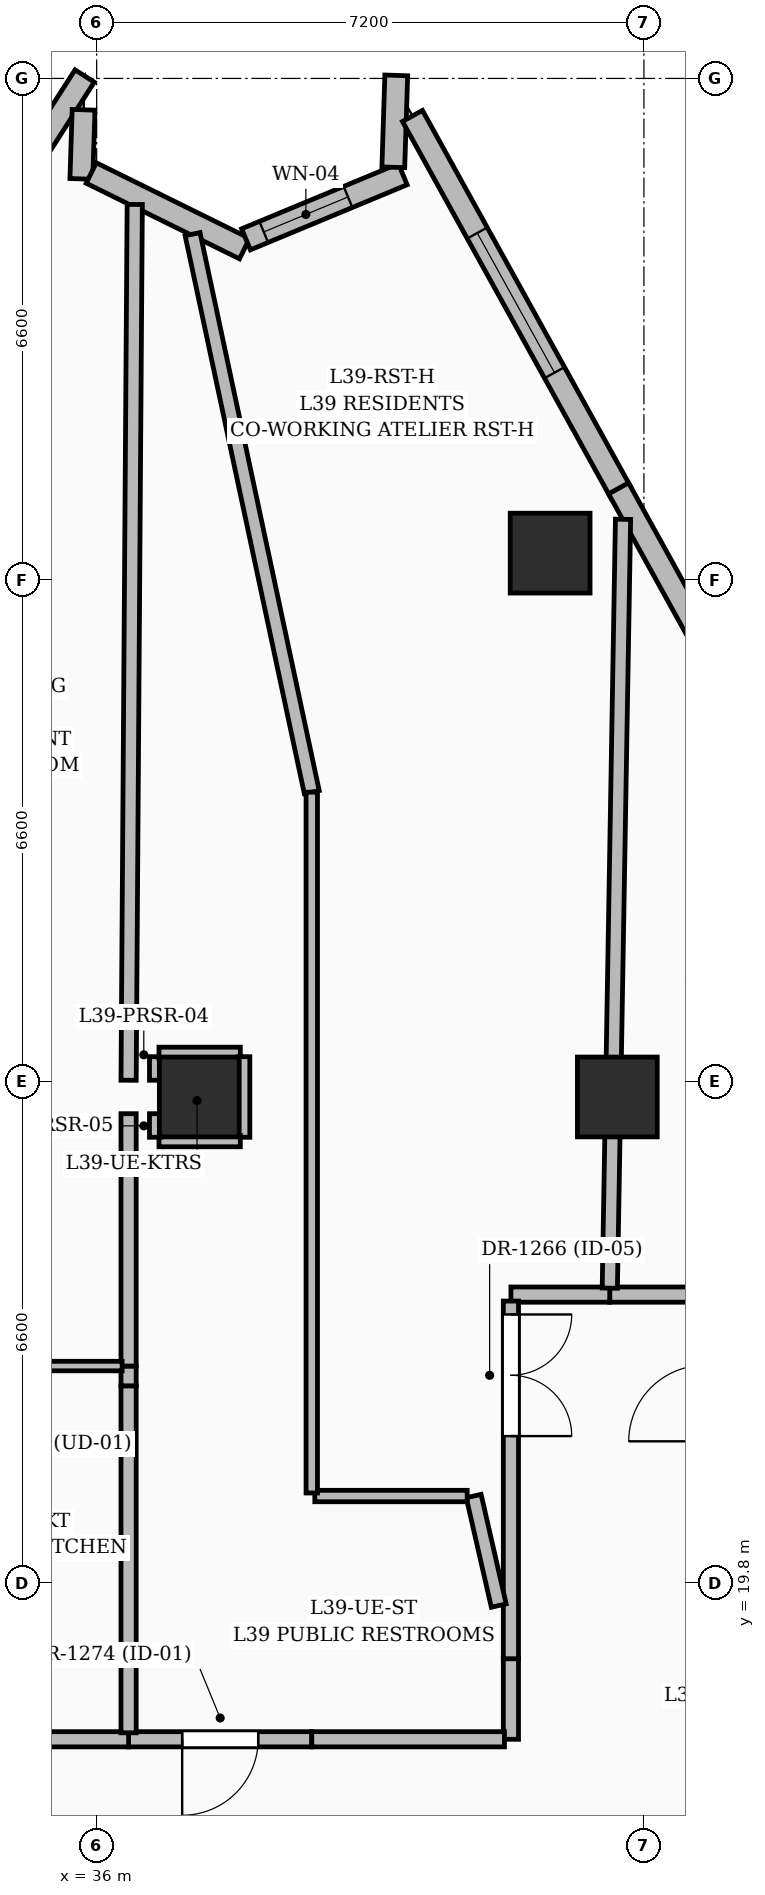
"""IFC4 building model, lengths in metres.
Left out: names, types, materials, properties, quantities, classifications, styles, units other than length and angle.
Written with IfcOpenShell. Run it as: python <this file> out.ifc"""

import sys

from ifc_helpers import new_model, si_unit, direction, frame, frame_2d, origin, origin_2d, place, context, subcontext, project, spatial, rectangle, extrude, element, fill, save


model = new_model("IFC4")
c1 = context("Model", 3, precision=1e-05, world=origin(), true_north=direction((0.0, 1.0)))
c2 = subcontext(c1, "Body", "Model", "MODEL_VIEW")
j1 = project(units=[si_unit("LENGTHUNIT", "METRE"), si_unit("PLANEANGLEUNIT", "RADIAN")], contexts=[c1])
p1 = place(None, origin())
s1 = spatial("IfcSite", under=j1, at=p1, CompositionType="ELEMENT")
p2 = place(p1, origin())
s2 = spatial("IfcBuilding", under=s1, at=p2, CompositionType="ELEMENT")
p3 = place(p2, frame((0.0, 0.0, 153.6)))
s3 = spatial("IfcBuildingStorey", under=s2, at=p3, CompositionType="ELEMENT", Elevation=153.6)
for number, where, z_axis, x_axis in (
    (1, (42.85, 26.2, 0.0), (0.0, 0.0, 1.0), (1.0, 0.0, 0.0)),
    (2, (37.35, 26.2, 0.0), (0.0, 0.0, 1.0), (1.0, 0.0, 0.0)),
    (3, (41.966, 33.355, 0.0), (0.0, 0.0, 1.0), (1.0, 0.0, 0.0)),
):
    element("IfcColumn", number, at=place(p3, frame(where, z_axis=z_axis, x_axis=x_axis)), inside=s3, PredefinedType="COLUMN", context=c2, shape_type="SweptSolid", body=[
        extrude(rectangle(XDim=1.05, YDim=1.05, at=origin_2d()), origin(), (0.0, 0.0, 1.0), 3.6),
    ])
p4 = place(p3, frame((32.455, 34.345, 0.0), z_axis=(0.0, 0.0, 1.0), x_axis=(0.539489448276, 0.841992360535, 0.0)))
e4 = element("IfcWall", 4, at=p4, inside=s3, PredefinedType="SOLIDWALL", context=c2, shape_type="SweptSolid", body=[
    extrude(rectangle(XDim=6.279, YDim=0.3, at=frame_2d((3.14, 0.0))), origin(), (0.0, 0.0, 1.0), 3.35),
])
p5 = place(p4, frame((1.75, 0.0, 0.6)))
e5 = element("IfcOpeningElement", 5, at=p5, cuts=e4, PredefinedType="OPENING", context=c2, shape_type="SweptSolid", body=[
    extrude(rectangle(XDim=1.8, YDim=2.1, at=frame_2d((0.9, 1.05))), frame((0.0, 0.16, 0.0), z_axis=(0.0, -1.0, 0.0), x_axis=(1.0, 0.0, 0.0)), (0.0, 0.0, 1.0), 0.32),
])
p6 = place(p3, frame((35.828, 39.187, 0.0), z_axis=(0.0, 0.0, 1.0), x_axis=(-0.031938584897, -0.999489833262, 0.0)))
e6 = element("IfcWall", 6, at=p6, inside=s3, PredefinedType="SOLIDWALL", context=c2, shape_type="SweptSolid", body=[
    extrude(rectangle(XDim=0.91, YDim=0.3, at=frame_2d((0.455, 0.0))), origin(), (0.0, 0.0, 1.0), 3.35),
])
p7 = place(p3, frame((35.928, 38.356, 0.0), z_axis=(0.0, 0.0, 1.0), x_axis=(0.896845505116, -0.442343915922, 0.0)))
e7 = element("IfcWall", 7, at=p7, inside=s3, PredefinedType="SOLIDWALL", context=c2, shape_type="SweptSolid", body=[
    extrude(rectangle(XDim=2.249, YDim=0.3, at=frame_2d((1.125, 0.0))), origin(), (0.0, 0.0, 1.0), 3.35),
])
p8 = place(p3, frame((37.965, 37.483, 0.0), z_axis=(0.0, 0.0, 1.0), x_axis=(0.923541991646, 0.383497313766, 0.0)))
e8 = element("IfcWall", 8, at=p8, inside=s3, PredefinedType="SOLIDWALL", context=c2, shape_type="SweptSolid", body=[
    extrude(rectangle(XDim=2.233, YDim=0.3, at=frame_2d((1.117, 0.0))), origin(), (0.0, 0.0, 1.0), 3.35),
])
p9 = place(p8, frame((0.253, 0.0, 0.8)))
e9 = element("IfcOpeningElement", 9, at=p9, cuts=e8, PredefinedType="OPENING", context=c2, shape_type="SweptSolid", body=[
    extrude(rectangle(XDim=1.2, YDim=1.8, at=frame_2d((0.6, 0.9))), frame((0.0, 0.16, 0.0), z_axis=(0.0, -1.0, 0.0), x_axis=(1.0, 0.0, 0.0)), (0.0, 0.0, 1.0), 0.32),
])
p10 = place(p3, frame((39.903, 38.431, 0.0), z_axis=(0.0, 0.0, 1.0), x_axis=(0.032091701063, 0.999484928712, 0.0)))
e10 = element("IfcWall", 10, at=p10, inside=s3, PredefinedType="SOLIDWALL", context=c2, shape_type="SweptSolid", body=[
    extrude(rectangle(XDim=1.21, YDim=0.3, at=frame_2d((0.605, 0.0))), origin(), (0.0, 0.0, 1.0), 3.35),
])
p11 = place(p3, frame((40.155, 39.106, 0.0), z_axis=(0.0, 0.0, 1.0), x_axis=(0.484204903903, -0.874954633702, 0.0)))
e11 = element("IfcWall", 11, at=p11, inside=s3, PredefinedType="SOLIDWALL", context=c2, shape_type="SweptSolid", body=[
    extrude(rectangle(XDim=5.653, YDim=0.3, at=frame_2d((2.827, 0.0))), origin(), (0.0, 0.0, 1.0), 3.35),
])
p12 = place(p11, frame((1.76, 0.0, 0.55)))
e12 = element("IfcOpeningElement", 12, at=p12, cuts=e11, PredefinedType="OPENING", context=c2, shape_type="SweptSolid", body=[
    extrude(rectangle(XDim=2.1, YDim=2.4, at=frame_2d((1.05, 1.2))), frame((0.0, 0.16, 0.0), z_axis=(0.0, -1.0, 0.0), x_axis=(1.0, 0.0, 0.0)), (0.0, 0.0, 1.0), 0.32),
])
p13 = place(p3, frame((42.866, 34.206, 0.0), z_axis=(0.0, 0.0, 1.0), x_axis=(0.484193476584, -0.874960957548, 0.0)))
e13 = element("IfcWall", 13, at=p13, inside=s3, PredefinedType="SOLIDWALL", context=c2, shape_type="SweptSolid", body=[
    extrude(rectangle(XDim=5.48, YDim=0.3, at=frame_2d((2.74, 0.0))), origin(), (0.0, 0.0, 1.0), 3.35),
])
p14 = place(p13, frame((2.145, 0.0, 0.6)))
e14 = element("IfcOpeningElement", 14, at=p14, cuts=e13, PredefinedType="OPENING", context=c2, shape_type="SweptSolid", body=[
    extrude(rectangle(XDim=1.8, YDim=2.1, at=frame_2d((0.9, 1.05))), frame((0.0, 0.16, 0.0), z_axis=(0.0, -1.0, 0.0), x_axis=(1.0, 0.0, 0.0)), (0.0, 0.0, 1.0), 0.32),
])
p15 = place(p3, frame((38.83, 17.75, 0.0), z_axis=(0.0, 0.0, 1.0), x_axis=(-1.0, 0.0, 0.0)))
e15 = element("IfcWall", 15, at=p15, inside=s3, PredefinedType="PARTITIONING", context=c2, shape_type="SweptSolid", body=[
    extrude(rectangle(XDim=2.41, YDim=0.2, at=frame_2d((1.205, 0.0))), origin(), (0.0, 0.0, 1.0), 3.35),
])
p16 = place(p15, frame((0.705, 0.0, 0.0)))
e16 = element("IfcOpeningElement", 16, at=p16, cuts=e15, PredefinedType="OPENING", context=c2, shape_type="SweptSolid", body=[
    extrude(rectangle(XDim=1.0, YDim=2.2, at=frame_2d((0.5, 1.1))), frame((0.0, 0.11, 0.0), z_axis=(0.0, -1.0, 0.0), x_axis=(1.0, 0.0, 0.0)), (0.0, 0.0, 1.0), 0.22),
])
p17 = place(p3, frame((41.45, 18.81, 0.0), z_axis=(0.0, 0.0, 1.0), x_axis=(0.0, -1.0, 0.0)))
e17 = element("IfcWall", 17, at=p17, inside=s3, PredefinedType="PARTITIONING", context=c2, shape_type="SweptSolid", body=[
    extrude(rectangle(XDim=1.06, YDim=0.2, at=frame_2d((0.53, 0.0))), origin(), (0.0, 0.0, 1.0), 3.35),
])
p18 = place(p3, frame((41.365, 17.75, 0.0), z_axis=(0.0, 0.0, 1.0), x_axis=(-1.0, 0.0, 0.0)))
e18 = element("IfcWall", 18, at=p18, inside=s3, PredefinedType="PARTITIONING", context=c2, shape_type="SweptSolid", body=[
    extrude(rectangle(XDim=2.535, YDim=0.2, at=frame_2d((1.268, 0.0))), origin(), (0.0, 0.0, 1.0), 3.35),
])
p19 = place(p3, frame((43.915, 23.6, 0.0), z_axis=(0.0, 0.0, 1.0), x_axis=(-1.0, 0.0, 0.0)))
e19 = element("IfcWall", 19, at=p19, inside=s3, PredefinedType="PARTITIONING", context=c2, shape_type="SweptSolid", body=[
    extrude(rectangle(XDim=1.165, YDim=0.2, at=frame_2d((0.583, 0.0))), origin(), (0.0, 0.0, 1.0), 2.436),
])
p20 = place(p3, frame((36.42, 17.75, 0.0), z_axis=(0.0, 0.0, 1.0), x_axis=(-1.0, 0.0, 0.0)))
e20 = element("IfcWall", 20, at=p20, inside=s3, PredefinedType="PARTITIONING", context=c2, shape_type="SweptSolid", body=[
    extrude(rectangle(XDim=2.8, YDim=0.2, at=frame_2d((1.4, 0.0))), origin(), (0.0, 0.0, 1.0), 2.436),
])
p21 = place(p3, frame((42.75, 23.6, 0.0), z_axis=(0.0, 0.0, 1.0), x_axis=(-1.0, 0.0, 0.0)))
e21 = element("IfcWall", 21, at=p21, inside=s3, PredefinedType="PARTITIONING", context=c2, shape_type="SweptSolid", body=[
    extrude(rectangle(XDim=1.3, YDim=0.2, at=frame_2d((0.65, 0.0))), origin(), (0.0, 0.0, 1.0), 3.35),
])
p22 = place(p3, frame((41.45, 23.515, 0.0), z_axis=(0.0, 0.0, 1.0), x_axis=(0.0, -1.0, 0.0)))
e22 = element("IfcWall", 22, at=p22, inside=s3, PredefinedType="PARTITIONING", context=c2, shape_type="SweptSolid", body=[
    extrude(rectangle(XDim=4.705, YDim=0.2, at=frame_2d((2.353, 0.0))), origin(), (0.0, 0.0, 1.0), 3.35),
])
p23 = place(p22, frame((0.176, 0.0, 0.0)))
e23 = element("IfcOpeningElement", 23, at=p23, cuts=e22, PredefinedType="OPENING", context=c2, shape_type="SweptSolid", body=[
    extrude(rectangle(XDim=1.6, YDim=2.3, at=frame_2d((0.8, 1.15))), frame((0.0, 0.11, 0.0), z_axis=(0.0, -1.0, 0.0), x_axis=(1.0, 0.0, 0.0)), (0.0, 0.0, 1.0), 0.22),
])
p24 = place(p3, frame((36.42, 22.4, 0.0), z_axis=(0.0, 0.0, 1.0), x_axis=(0.0, -1.0, 0.0)))
e24 = element("IfcWall", 24, at=p24, inside=s3, PredefinedType="PARTITIONING", context=c2, shape_type="SweptSolid", body=[
    extrude(rectangle(XDim=4.565, YDim=0.2, at=frame_2d((2.282, 0.0))), origin(), (0.0, 0.0, 1.0), 3.35),
])
p25 = place(p3, frame((36.42, 22.66, 0.0), z_axis=(0.0, 0.0, 1.0), x_axis=(0.0, -1.0, 0.0)))
e25 = element("IfcWall", 25, at=p25, inside=s3, PredefinedType="PARTITIONING", context=c2, shape_type="SweptSolid", body=[
    extrude(rectangle(XDim=0.26, YDim=0.2, at=frame_2d((0.13, 0.0))), origin(), (0.0, 0.0, 1.0), 3.35),
])
p26 = place(p3, frame((36.42, 25.98, 0.0), z_axis=(0.0, 0.0, 1.0), x_axis=(0.0, -1.0, 0.0)))
e26 = element("IfcWall", 26, at=p26, inside=s3, PredefinedType="PARTITIONING", context=c2, shape_type="SweptSolid", body=[
    extrude(rectangle(XDim=3.32, YDim=0.2, at=frame_2d((1.66, 0.0))), origin(), (0.0, 0.0, 1.0), 2.436),
])
p27 = place(p3, frame((36.501, 37.942, 0.0), z_axis=(0.0, 0.0, 1.0), x_axis=(-0.007034618495, -0.999975256765, 0.0)))
e27 = element("IfcWall", 27, at=p27, inside=s3, PredefinedType="PARTITIONING", context=c2, shape_type="SweptSolid", body=[
    extrude(rectangle(XDim=11.522, YDim=0.2, at=frame_2d((5.761, 0.0))), origin(), (0.0, 0.0, 1.0), 2.393),
])
p28 = place(p3, frame((38.83, 30.21, 0.0), z_axis=(0.0, 0.0, 1.0), x_axis=(-0.208896033751, 0.977937854407, 0.0)))
e28 = element("IfcWall", 28, at=p28, inside=s3, PredefinedType="PARTITIONING", context=c2, shape_type="SweptSolid", body=[
    extrude(rectangle(XDim=7.507, YDim=0.2, at=frame_2d((3.753, 0.0))), origin(), (0.0, 0.0, 1.0), 2.57),
])
p29 = place(p3, frame((41.29, 19.509, 0.0), z_axis=(0.0, 0.0, 1.0), x_axis=(-0.223291159638, 0.974751793036, 0.0)))
e29 = element("IfcWall", 29, at=p29, inside=s3, PredefinedType="PARTITIONING", context=c2, shape_type="SweptSolid", body=[
    extrude(rectangle(XDim=1.478, YDim=0.2, at=frame_2d((0.739, 0.0))), origin(), (0.0, 0.0, 1.0), 3.35),
])
p30 = place(p3, frame((42.925, 33.8, 0.0), z_axis=(0.0, 0.0, 1.0), x_axis=(-0.017206788201, -0.999851952261, 0.0)))
e30 = element("IfcWall", 30, at=p30, inside=s3, PredefinedType="PARTITIONING", context=c2, shape_type="SweptSolid", body=[
    extrude(rectangle(XDim=10.116, YDim=0.2, at=frame_2d((5.058, 0.0))), origin(), (0.0, 0.0, 1.0), 2.393),
])
p31 = place(p3, frame((36.335, 22.66, 0.0), z_axis=(0.0, 0.0, 1.0), x_axis=(-1.0, 0.0, 0.0)))
e31 = element("IfcWall", 31, at=p31, inside=s3, PredefinedType="PARTITIONING", context=c2, shape_type="SweptSolid", body=[
    extrude(rectangle(XDim=3.087, YDim=0.125, at=frame_2d((1.544, 0.0))), origin(), (0.0, 0.0, 1.0), 2.436),
])
p32 = place(p31, frame((0.991, 0.0, 0.0)))
e32 = element("IfcOpeningElement", 32, at=p32, cuts=e31, PredefinedType="OPENING", context=c2, shape_type="SweptSolid", body=[
    extrude(rectangle(XDim=0.95, YDim=2.2, at=frame_2d((0.475, 1.1))), frame((0.0, 0.072, 0.0), z_axis=(0.0, -1.0, 0.0), x_axis=(1.0, 0.0, 0.0)), (0.0, 0.0, 1.0), 0.145),
])
p33 = place(p3, frame((36.77, 26.42, 0.0), z_axis=(0.0, 0.0, 1.0), x_axis=(0.0, 1.0, 0.0)))
e33 = element("IfcWall", 33, at=p33, inside=s3, PredefinedType="PARTITIONING", context=c2, shape_type="SweptSolid", body=[
    extrude(rectangle(XDim=0.31, YDim=0.15, at=frame_2d((0.155, 0.0))), origin(), (0.0, 0.0, 1.0), 2.393),
])
p34 = place(p3, frame((36.82, 26.78, 0.0), z_axis=(0.0, 0.0, 1.0), x_axis=(1.0, 0.0, 0.0)))
e34 = element("IfcWall", 34, at=p34, inside=s3, PredefinedType="PARTITIONING", context=c2, shape_type="SweptSolid", body=[
    extrude(rectangle(XDim=1.07, YDim=0.15, at=frame_2d((0.535, 0.0))), origin(), (0.0, 0.0, 1.0), 2.393),
])
p35 = place(p3, frame((37.94, 26.73, 0.0), z_axis=(0.0, 0.0, 1.0), x_axis=(0.0, -1.0, 0.0)))
e35 = element("IfcWall", 35, at=p35, inside=s3, PredefinedType="PARTITIONING", context=c2, shape_type="SweptSolid", body=[
    extrude(rectangle(XDim=1.06, YDim=0.15, at=frame_2d((0.53, 0.0))), origin(), (0.0, 0.0, 1.0), 2.436),
])
p36 = place(p3, frame((37.89, 25.62, 0.0), z_axis=(0.0, 0.0, 1.0), x_axis=(-1.0, 0.0, 0.0)))
e36 = element("IfcWall", 36, at=p36, inside=s3, PredefinedType="PARTITIONING", context=c2, shape_type="SweptSolid", body=[
    extrude(rectangle(XDim=1.07, YDim=0.15, at=frame_2d((0.535, 0.0))), origin(), (0.0, 0.0, 1.0), 2.436),
])
p37 = place(p3, frame((36.77, 25.67, 0.0), z_axis=(0.0, 0.0, 1.0), x_axis=(0.0, 1.0, 0.0)))
e37 = element("IfcWall", 37, at=p37, inside=s3, PredefinedType="PARTITIONING", context=c2, shape_type="SweptSolid", body=[
    extrude(rectangle(XDim=0.31, YDim=0.15, at=frame_2d((0.155, 0.0))), origin(), (0.0, 0.0, 1.0), 3.35),
])
p38 = place(p3, frame((40.875, 20.95, 0.0), z_axis=(0.0, 0.0, 1.0), x_axis=(-1.0, 0.0, 0.0)))
e38 = element("IfcWall", 38, at=p38, inside=s3, PredefinedType="PARTITIONING", context=c2, shape_type="SweptSolid", body=[
    extrude(rectangle(XDim=2.005, YDim=0.15, at=frame_2d((1.002, 0.0))), origin(), (0.0, 0.0, 1.0), 3.35),
])
p39 = place(p3, frame((38.83, 20.99, 0.0), z_axis=(0.0, 0.0, 1.0), x_axis=(0.0, 1.0, 0.0)))
e39 = element("IfcWall", 39, at=p39, inside=s3, PredefinedType="PARTITIONING", context=c2, shape_type="SweptSolid", body=[
    extrude(rectangle(XDim=9.22, YDim=0.15, at=frame_2d((4.61, 0.0))), origin(), (0.0, 0.0, 1.0), 2.436),
])
p40 = place(p9, origin())
e40 = element("IfcWindow", 40, at=p40, inside=s3, PartitioningType="SINGLE_PANEL", PredefinedType="WINDOW", context=c2, shape_type="SweptSolid", body=[
    extrude(rectangle(XDim=1.2, YDim=1.8, at=frame_2d((0.6, 0.9))), frame((0.0, 0.03, 0.0), z_axis=(0.0, -1.0, 0.0), x_axis=(1.0, 0.0, 0.0)), (0.0, 0.0, 1.0), 0.06),
])
fill(e9, e40)
p41 = place(p12, origin())
e41 = element("IfcWindow", 41, at=p41, inside=s3, PartitioningType="SINGLE_PANEL", PredefinedType="WINDOW", context=c2, shape_type="SweptSolid", body=[
    extrude(rectangle(XDim=2.1, YDim=2.4, at=frame_2d((1.05, 1.2))), frame((0.0, 0.03, 0.0), z_axis=(0.0, -1.0, 0.0), x_axis=(1.0, 0.0, 0.0)), (0.0, 0.0, 1.0), 0.06),
])
fill(e12, e41)
p42 = place(p23, origin())
e42 = element("IfcDoor", 42, at=p42, inside=s3, OperationType="DOUBLE_DOOR_SINGLE_SWING", PredefinedType="DOOR", context=c2, shape_type="SweptSolid", body=[
    extrude(rectangle(XDim=1.6, YDim=2.3, at=frame_2d((0.8, 1.15))), frame((0.0, 0.025, 0.0), z_axis=(0.0, -1.0, 0.0), x_axis=(1.0, 0.0, 0.0)), (0.0, 0.0, 1.0), 0.05),
])
fill(e23, e42)
p43 = place(p16, origin())
e43 = element("IfcDoor", 43, at=p43, inside=s3, OperationType="SINGLE_SWING_RIGHT", PredefinedType="DOOR", context=c2, shape_type="SweptSolid", body=[
    extrude(rectangle(XDim=1.0, YDim=2.2, at=frame_2d((0.5, 1.1))), frame((0.0, 0.025, 0.0), z_axis=(0.0, -1.0, 0.0), x_axis=(1.0, 0.0, 0.0)), (0.0, 0.0, 1.0), 0.05),
])
fill(e16, e43)
save(model, sys.argv[1])
